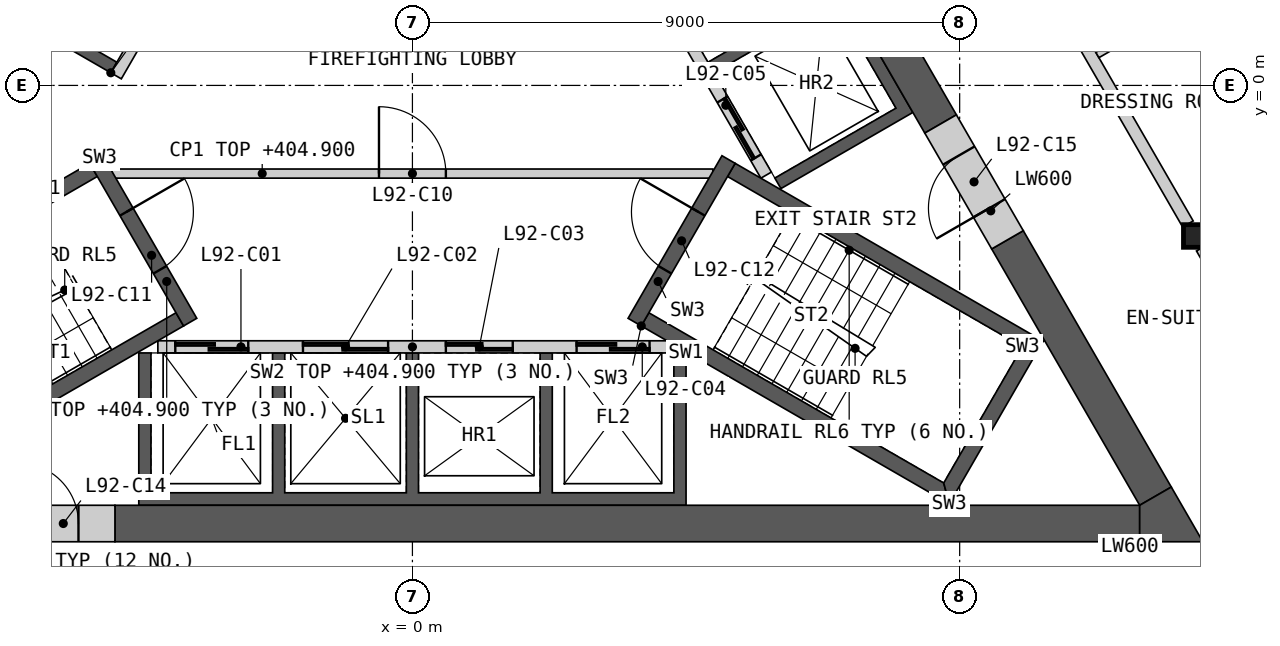
"""IFC4 building model, lengths in metres.
Left out: names, types, materials, properties, quantities, classifications, styles, units other than length and angle.
Written with IfcOpenShell. Run it as: python <this file> out.ifc"""

import sys

from ifc_helpers import new_model, si_unit, direction, frame, frame_2d, origin, origin_2d, place, context, subcontext, project, spatial, polyline, rectangle, i_section, outline, extrude, element, fill, save


model = new_model("IFC4")
c1 = context("Model", 3, precision=1e-05, world=origin(), true_north=direction((0.0, 1.0)))
c2 = subcontext(c1, "Body", "Model", "MODEL_VIEW")
j1 = project(units=[si_unit("LENGTHUNIT", "METRE"), si_unit("PLANEANGLEUNIT", "RADIAN")], contexts=[c1])
p1 = place(None, origin())
s1 = spatial("IfcSite", under=j1, at=p1, CompositionType="ELEMENT")
p2 = place(p1, origin())
s2 = spatial("IfcBuilding", under=s1, at=p2, CompositionType="ELEMENT")
p3 = place(p2, frame((0.0, 0.0, 401.8)))
s3 = spatial("IfcBuildingStorey", under=s2, at=p3, CompositionType="ELEMENT", Elevation=401.8)
p4 = place(p3, frame((12.868, -2.476, 0.0), z_axis=(0.0, 0.0, 1.0), x_axis=(1.0, 0.0, 0.0)))
e1 = element("IfcColumn", 1, at=p4, inside=s3, PredefinedType="COLUMN", context=c2, shape_type="SweptSolid", body=[
    extrude(i_section(OverallWidth=0.374, OverallDepth=0.372, WebThickness=0.016, FlangeThickness=0.026, at=origin_2d()), origin(), (0.0, 0.0, 1.0), 3.4),
])
p5 = place(p3, origin())
e2 = element("IfcWall", 2, at=p5, inside=s3, PredefinedType="SHEAR", context=c2, shape_type="SweptSolid", body=[
    extrude(outline(polyline([(4.5, -4.4), (4.5, -6.906), (-4.5, -6.906), (-4.5, -4.4), (-4.3, -4.4), (-4.3, -6.7), (-2.3, -6.7), (-2.3, -4.4), (-2.1, -4.4), (-2.1, -6.7), (-0.1, -6.7), (-0.1, -4.4), (0.1, -4.4), (0.1, -6.7), (2.1, -6.7), (2.1, -4.4), (2.3, -4.4), (2.3, -6.7), (4.3, -6.7), (4.3, -4.4), (4.5, -4.4)])), origin(), (0.0, 0.0, 1.0), 3.1),
])
p6 = place(p3, frame((-4.187, -4.3, 0.0), z_axis=(0.0, 0.0, 1.0), x_axis=(1.0, 0.0, 0.0)))
e3 = element("IfcWall", 3, at=p6, inside=s3, PredefinedType="SOLIDWALL", context=c2, shape_type="SweptSolid", body=[
    extrude(rectangle(XDim=8.373, YDim=0.2, at=frame_2d((4.187, 0.0))), origin(), (0.0, 0.0, 1.0), 3.1),
])
p7 = place(p6, frame((0.287, 0.0, 0.0)))
e4 = element("IfcOpeningElement", 4, at=p7, cuts=e3, PredefinedType="OPENING", context=c2, shape_type="SweptSolid", body=[
    extrude(rectangle(XDim=1.2, YDim=2.1, at=frame_2d((0.6, 1.05))), frame((0.0, 0.11, 0.0), z_axis=(0.0, -1.0, 0.0), x_axis=(1.0, 0.0, 0.0)), (0.0, 0.0, 1.0), 0.22),
])
p8 = place(p6, frame((2.387, 0.0, 0.0)))
e5 = element("IfcOpeningElement", 5, at=p8, cuts=e3, PredefinedType="OPENING", context=c2, shape_type="SweptSolid", body=[
    extrude(rectangle(XDim=1.4, YDim=2.1, at=frame_2d((0.7, 1.05))), frame((0.0, 0.11, 0.0), z_axis=(0.0, -1.0, 0.0), x_axis=(1.0, 0.0, 0.0)), (0.0, 0.0, 1.0), 0.22),
])
p9 = place(p6, frame((4.737, 0.0, 0.0)))
e6 = element("IfcOpeningElement", 6, at=p9, cuts=e3, PredefinedType="OPENING", context=c2, shape_type="SweptSolid", body=[
    extrude(rectangle(XDim=1.1, YDim=2.1, at=frame_2d((0.55, 1.05))), frame((0.0, 0.11, 0.0), z_axis=(0.0, -1.0, 0.0), x_axis=(1.0, 0.0, 0.0)), (0.0, 0.0, 1.0), 0.22),
])
p10 = place(p6, frame((6.887, 0.0, 0.0)))
e7 = element("IfcOpeningElement", 7, at=p10, cuts=e3, PredefinedType="OPENING", context=c2, shape_type="SweptSolid", body=[
    extrude(rectangle(XDim=1.2, YDim=2.1, at=frame_2d((0.6, 1.05))), frame((0.0, 0.11, 0.0), z_axis=(0.0, -1.0, 0.0), x_axis=(1.0, 0.0, 0.0)), (0.0, 0.0, 1.0), 0.22),
])
p11 = place(p3, origin())
e8 = element("IfcWall", 8, at=p11, inside=s3, PredefinedType="SHEAR", context=c2, shape_type="SweptSolid", body=[
    extrude(outline(polyline([(1.561, 6.097), (3.731, 7.35), (8.231, -0.444), (6.061, -1.697), (5.96, -1.524), (7.952, -0.374), (6.952, 1.358), (4.96, 0.208), (4.861, 0.381), (6.852, 1.531), (5.852, 3.263), (3.861, 2.113), (3.76, 2.287), (5.752, 3.437), (4.752, 5.169), (2.76, 4.019), (2.66, 4.192), (4.652, 5.342), (3.652, 7.074), (1.66, 5.924), (1.561, 6.097)])), origin(), (0.0, 0.0, 1.0), 3.1),
])
p12 = place(p3, frame((5.817, -1.476, 0.0), z_axis=(0.0, 0.0, 1.0), x_axis=(-0.500002616675, 0.866023893041, 0.0)))
e9 = element("IfcWall", 9, at=p12, inside=s3, PredefinedType="SOLIDWALL", context=c2, shape_type="SweptSolid", body=[
    extrude(rectangle(XDim=8.373, YDim=0.2, at=frame_2d((4.187, 0.0))), origin(), (0.0, 0.0, 1.0), 3.1),
])
p13 = place(p12, frame((0.337, 0.0, 0.0)))
e10 = element("IfcOpeningElement", 10, at=p13, cuts=e9, PredefinedType="OPENING", context=c2, shape_type="SweptSolid", body=[
    extrude(rectangle(XDim=1.1, YDim=2.1, at=frame_2d((0.55, 1.05))), frame((0.0, 0.11, 0.0), z_axis=(0.0, -1.0, 0.0), x_axis=(1.0, 0.0, 0.0)), (0.0, 0.0, 1.0), 0.22),
])
p14 = place(p12, frame((2.537, 0.0, 0.0)))
e11 = element("IfcOpeningElement", 11, at=p14, cuts=e9, PredefinedType="OPENING", context=c2, shape_type="SweptSolid", body=[
    extrude(rectangle(XDim=1.1, YDim=2.1, at=frame_2d((0.55, 1.05))), frame((0.0, 0.11, 0.0), z_axis=(0.0, -1.0, 0.0), x_axis=(1.0, 0.0, 0.0)), (0.0, 0.0, 1.0), 0.22),
])
p15 = place(p12, frame((4.737, 0.0, 0.0)))
e12 = element("IfcOpeningElement", 12, at=p15, cuts=e9, PredefinedType="OPENING", context=c2, shape_type="SweptSolid", body=[
    extrude(rectangle(XDim=1.1, YDim=2.1, at=frame_2d((0.55, 1.05))), frame((0.0, 0.11, 0.0), z_axis=(0.0, -1.0, 0.0), x_axis=(1.0, 0.0, 0.0)), (0.0, 0.0, 1.0), 0.22),
])
p16 = place(p12, frame((7.037, 0.0, 0.0)))
e13 = element("IfcOpeningElement", 13, at=p16, cuts=e9, PredefinedType="OPENING", context=c2, shape_type="SweptSolid", body=[
    extrude(rectangle(XDim=0.9, YDim=2.1, at=frame_2d((0.45, 1.05))), frame((0.0, 0.11, 0.0), z_axis=(0.0, -1.0, 0.0), x_axis=(1.0, 0.0, 0.0)), (0.0, 0.0, 1.0), 0.22),
])
p17 = place(p3, origin())
e14 = element("IfcWall", 14, at=p17, inside=s3, PredefinedType="SHEAR", context=c2, shape_type="SweptSolid", body=[
    extrude(outline(polyline([(-4.96, 0.208), (-7.131, 1.461), (-3.731, 7.35), (-1.561, 6.097), (-1.66, 5.924), (-3.652, 7.074), (-6.852, 1.531), (-4.861, 0.381), (-4.96, 0.208)])), origin(), (0.0, 0.0, 1.0), 3.1),
])
p18 = place(p3, frame((-1.631, 5.776, 0.0), z_axis=(0.0, 0.0, 1.0), x_axis=(-0.499992876559, -0.866029516466, 0.0)))
e15 = element("IfcWall", 15, at=p18, inside=s3, PredefinedType="SOLIDWALL", context=c2, shape_type="SweptSolid", body=[
    extrude(rectangle(XDim=6.486, YDim=0.2, at=frame_2d((3.243, 0.0))), origin(), (0.0, 0.0, 1.0), 3.1),
])
p19 = place(p18, frame((2.637, 0.0, 0.0)))
e16 = element("IfcOpeningElement", 16, at=p19, cuts=e15, PredefinedType="OPENING", context=c2, shape_type="SweptSolid", body=[
    extrude(rectangle(XDim=0.9, YDim=2.1, at=frame_2d((0.45, 1.05))), frame((0.0, 0.11, 0.0), z_axis=(0.0, -1.0, 0.0), x_axis=(1.0, 0.0, 0.0)), (0.0, 0.0, 1.0), 0.22),
])
p20 = place(p3, frame((-4.941, -1.45, 0.0), z_axis=(0.0, 0.0, 1.0), x_axis=(1.0, 0.0, 0.0)))
e17 = element("IfcWall", 17, at=p20, inside=s3, PredefinedType="PARTITIONING", context=c2, shape_type="SweptSolid", body=[
    extrude(rectangle(XDim=9.882, YDim=0.15, at=frame_2d((4.941, 0.0))), origin(), (0.0, 0.0, 1.0), 3.1),
])
p21 = place(p20, frame((4.391, 0.0, 0.0)))
e18 = element("IfcOpeningElement", 18, at=p21, cuts=e17, PredefinedType="OPENING", context=c2, shape_type="SweptSolid", body=[
    extrude(rectangle(XDim=1.1, YDim=2.1, at=frame_2d((0.55, 1.05))), frame((0.0, 0.085, 0.0), z_axis=(0.0, -1.0, 0.0), x_axis=(1.0, 0.0, 0.0)), (0.0, 0.0, 1.0), 0.17),
])
p22 = place(p3, origin())
e19 = element("IfcWall", 19, at=p22, inside=s3, PredefinedType="SHEAR", context=c2, shape_type="SweptSolid", body=[
    extrude(outline(polyline([(-5.307, -1.281), (-10.374, -4.206), (-10.032, -4.298), (-5.182, -1.498), (-5.307, -1.281)])), origin(), (0.0, 0.0, 1.0), 3.1),
])
p23 = place(p3, origin())
e20 = element("IfcWall", 20, at=p23, inside=s3, PredefinedType="SHEAR", context=c2, shape_type="SweptSolid", body=[
    extrude(outline(polyline([(-8.738, -6.539), (-8.83, -6.881), (-3.763, -3.956), (-3.888, -3.739), (-8.738, -6.539)])), origin(), (0.0, 0.0, 1.0), 3.1),
])
p24 = place(p3, frame((-5.199, -1.219, 0.0), z_axis=(0.0, 0.0, 1.0), x_axis=(0.499982516597, -0.866035497597, 0.0)))
e21 = element("IfcWall", 21, at=p24, inside=s3, PredefinedType="SHEAR", context=c2, shape_type="SweptSolid", body=[
    extrude(rectangle(XDim=3.088, YDim=0.25, at=frame_2d((1.544, 0.0))), origin(), (0.0, 0.0, 1.0), 3.1),
])
p25 = place(p24, frame((0.994, 0.0, 0.0)))
e22 = element("IfcOpeningElement", 22, at=p25, cuts=e21, PredefinedType="OPENING", context=c2, shape_type="SweptSolid", body=[
    extrude(rectangle(XDim=1.1, YDim=2.1, at=frame_2d((0.55, 1.05))), frame((0.0, 0.135, 0.0), z_axis=(0.0, -1.0, 0.0), x_axis=(1.0, 0.0, 0.0)), (0.0, 0.0, 1.0), 0.27),
])
p26 = place(p3, origin())
e23 = element("IfcWall", 23, at=p26, inside=s3, PredefinedType="SHEAR", context=c2, shape_type="SweptSolid", body=[
    extrude(outline(polyline([(3.763, -3.956), (8.83, -6.881), (8.738, -6.539), (3.888, -3.739), (3.763, -3.956)])), origin(), (0.0, 0.0, 1.0), 3.1),
])
p27 = place(p3, origin())
e24 = element("IfcWall", 24, at=p27, inside=s3, PredefinedType="SHEAR", context=c2, shape_type="SweptSolid", body=[
    extrude(outline(polyline([(8.83, -6.881), (10.374, -4.206), (10.032, -4.298), (8.738, -6.539), (8.83, -6.881)])), origin(), (0.0, 0.0, 1.0), 3.1),
])
p28 = place(p3, origin())
e25 = element("IfcWall", 25, at=p28, inside=s3, PredefinedType="SHEAR", context=c2, shape_type="SweptSolid", body=[
    extrude(outline(polyline([(10.032, -4.298), (10.374, -4.206), (5.307, -1.281), (5.182, -1.498), (10.032, -4.298)])), origin(), (0.0, 0.0, 1.0), 3.1),
])
p29 = place(p3, frame((3.655, -3.893, 0.0), z_axis=(0.0, 0.0, 1.0), x_axis=(0.499982516597, 0.866035497597, 0.0)))
e26 = element("IfcWall", 26, at=p29, inside=s3, PredefinedType="SHEAR", context=c2, shape_type="SweptSolid", body=[
    extrude(rectangle(XDim=3.088, YDim=0.25, at=frame_2d((1.544, 0.0))), origin(), (0.0, 0.0, 1.0), 3.1),
])
p30 = place(p29, frame((0.994, 0.0, 0.0)))
e27 = element("IfcOpeningElement", 27, at=p30, cuts=e26, PredefinedType="OPENING", context=c2, shape_type="SweptSolid", body=[
    extrude(rectangle(XDim=1.1, YDim=2.1, at=frame_2d((0.55, 1.05))), frame((0.0, 0.135, 0.0), z_axis=(0.0, -1.0, 0.0), x_axis=(1.0, 0.0, 0.0)), (0.0, 0.0, 1.0), 0.27),
])
for number, where, z_axis, x_axis in (
    (28, (-4.892, -7.206, 0.0), (0.0, 0.0, 1.0), (1.0, 0.0, 0.0)),
    (29, (8.686, -0.634, 0.0), (0.0, 0.0, 1.0), (-0.5, 0.866, 0.0)),
):
    element("IfcWall", number, at=place(p3, frame(where, z_axis=z_axis, x_axis=x_axis)), inside=s3, PredefinedType="SHEAR", context=c2, shape_type="SweptSolid", body=[
        extrude(rectangle(XDim=16.853, YDim=0.6, at=frame_2d((8.426, 0.0))), origin(), (0.0, 0.0, 1.0), 3.1),
    ])
p31 = place(p3, frame((12.221, -6.756, 0.0), z_axis=(0.0, 0.0, 1.0), x_axis=(-0.50000604952, 0.866021911064, 0.0)))
e30 = element("IfcWall", 30, at=p31, inside=s3, PredefinedType="SHEAR", context=c2, shape_type="SweptSolid", body=[
    extrude(rectangle(XDim=4.869, YDim=0.6, at=frame_2d((2.434, 0.0))), origin(), (0.0, 0.0, 1.0), 3.1),
])
p32 = place(p3, origin())
e31 = element("IfcWall", 31, at=p32, inside=s3, PredefinedType="SHEAR", context=c2, shape_type="SweptSolid", body=[
    extrude(outline(polyline([(11.961, -7.506), (11.961, -6.906), (12.48, -6.606), (13.0, -7.506), (11.961, -7.506)])), origin(), (0.0, 0.0, 1.0), 3.1),
])
p33 = place(p3, frame((-7.092, -7.206, 0.0), z_axis=(0.0, 0.0, 1.0), x_axis=(1.0, 0.0, 0.0)))
e32 = element("IfcWall", 32, at=p33, inside=s3, PredefinedType="SHEAR", context=c2, shape_type="SweptSolid", body=[
    extrude(rectangle(XDim=2.2, YDim=0.6, at=frame_2d((1.1, 0.0))), origin(), (0.0, 0.0, 1.0), 3.1),
])
p34 = place(p33, frame((0.6, 0.0, 0.0)))
e33 = element("IfcOpeningElement", 33, at=p34, cuts=e32, PredefinedType="OPENING", context=c2, shape_type="SweptSolid", body=[
    extrude(rectangle(XDim=1.0, YDim=2.1, at=frame_2d((0.5, 1.05))), frame((0.0, 0.31, 0.0), z_axis=(0.0, -1.0, 0.0), x_axis=(1.0, 0.0, 0.0)), (0.0, 0.0, 1.0), 0.62),
])
p35 = place(p3, frame((9.786, -2.539, 0.0), z_axis=(0.0, 0.0, 1.0), x_axis=(-0.499981787252, 0.866035918664, 0.0)))
e34 = element("IfcWall", 34, at=p35, inside=s3, PredefinedType="SHEAR", context=c2, shape_type="SweptSolid", body=[
    extrude(rectangle(XDim=2.2, YDim=0.6, at=frame_2d((1.1, 0.0))), origin(), (0.0, 0.0, 1.0), 3.1),
])
p36 = place(p35, frame((0.6, 0.0, 0.0)))
e35 = element("IfcOpeningElement", 35, at=p36, cuts=e34, PredefinedType="OPENING", context=c2, shape_type="SweptSolid", body=[
    extrude(rectangle(XDim=1.0, YDim=2.1, at=frame_2d((0.5, 1.05))), frame((0.0, 0.31, 0.0), z_axis=(0.0, -1.0, 0.0), x_axis=(1.0, 0.0, 0.0)), (0.0, 0.0, 1.0), 0.62),
])
p37 = place(p3, frame((8.692, 4.756, 0.0), z_axis=(0.0, 0.0, 1.0), x_axis=(0.500001682468, -0.866024432409, 0.0)))
e36 = element("IfcWall", 36, at=p37, inside=s3, PredefinedType="PARTITIONING", context=c2, shape_type="SweptSolid", body=[
    extrude(rectangle(XDim=8.124, YDim=0.2, at=frame_2d((4.062, 0.0))), origin(), (0.0, 0.0, 1.0), 3.1),
])
p38 = place(p3, frame((12.981, -2.673, 0.0), z_axis=(0.0, 0.0, 1.0), x_axis=(0.499974648164, -0.866040040179, 0.0)))
e37 = element("IfcWall", 37, at=p38, inside=s3, PredefinedType="PARTITIONING", context=c2, shape_type="SweptSolid", body=[
    extrude(rectangle(XDim=4.525, YDim=0.2, at=frame_2d((2.263, 0.0))), origin(), (0.0, 0.0, 1.0), 3.1),
])
p39 = place(p38, frame((2.468, 0.0, 0.0)))
e38 = element("IfcOpeningElement", 38, at=p39, cuts=e37, PredefinedType="OPENING", context=c2, shape_type="SweptSolid", body=[
    extrude(rectangle(XDim=1.0, YDim=2.1, at=frame_2d((0.5, 1.05))), frame((0.0, 0.11, 0.0), z_axis=(0.0, -1.0, 0.0), x_axis=(1.0, 0.0, 0.0)), (0.0, 0.0, 1.0), 0.22),
])
p40 = place(p3, frame((11.265, 0.5, 0.0), z_axis=(0.0, 0.0, 1.0), x_axis=(0.866033839264, 0.499985389037, 0.0)))
e39 = element("IfcWall", 39, at=p40, inside=s3, PredefinedType="PARTITIONING", context=c2, shape_type="SweptSolid", body=[
    extrude(rectangle(XDim=7.1, YDim=0.1, at=frame_2d((3.55, 0.0))), origin(), (0.0, 0.0, 1.0), 2.33),
])
p41 = place(p40, frame((4.992, 0.0, 0.0)))
e40 = element("IfcOpeningElement", 40, at=p41, cuts=e39, PredefinedType="OPENING", context=c2, shape_type="SweptSolid", body=[
    extrude(rectangle(XDim=0.95, YDim=2.1, at=frame_2d((0.475, 1.05))), frame((0.0, 0.06, 0.0), z_axis=(0.0, -1.0, 0.0), x_axis=(1.0, 0.0, 0.0)), (0.0, 0.0, 1.0), 0.12),
])
p42 = place(p7, origin())
e41 = element("IfcDoor", 41, at=p42, inside=s3, OperationType="SLIDING_TO_LEFT", PredefinedType="DOOR", context=c2, shape_type="SweptSolid", body=[
    extrude(rectangle(XDim=1.2, YDim=2.1, at=frame_2d((0.6, 1.05))), frame((0.0, 0.025, 0.0), z_axis=(0.0, -1.0, 0.0), x_axis=(1.0, 0.0, 0.0)), (0.0, 0.0, 1.0), 0.05),
])
fill(e4, e41)
p43 = place(p8, origin())
e42 = element("IfcDoor", 42, at=p43, inside=s3, OperationType="SLIDING_TO_LEFT", PredefinedType="DOOR", context=c2, shape_type="SweptSolid", body=[
    extrude(rectangle(XDim=1.4, YDim=2.1, at=frame_2d((0.7, 1.05))), frame((0.0, 0.025, 0.0), z_axis=(0.0, -1.0, 0.0), x_axis=(1.0, 0.0, 0.0)), (0.0, 0.0, 1.0), 0.05),
])
fill(e5, e42)
p44 = place(p9, origin())
e43 = element("IfcDoor", 43, at=p44, inside=s3, OperationType="SLIDING_TO_LEFT", PredefinedType="DOOR", context=c2, shape_type="SweptSolid", body=[
    extrude(rectangle(XDim=1.1, YDim=2.1, at=frame_2d((0.55, 1.05))), frame((0.0, 0.025, 0.0), z_axis=(0.0, -1.0, 0.0), x_axis=(1.0, 0.0, 0.0)), (0.0, 0.0, 1.0), 0.05),
])
fill(e6, e43)
p45 = place(p10, origin())
e44 = element("IfcDoor", 44, at=p45, inside=s3, OperationType="SLIDING_TO_LEFT", PredefinedType="DOOR", context=c2, shape_type="SweptSolid", body=[
    extrude(rectangle(XDim=1.2, YDim=2.1, at=frame_2d((0.6, 1.05))), frame((0.0, 0.025, 0.0), z_axis=(0.0, -1.0, 0.0), x_axis=(1.0, 0.0, 0.0)), (0.0, 0.0, 1.0), 0.05),
])
fill(e7, e44)
p46 = place(p13, origin())
e45 = element("IfcDoor", 45, at=p46, inside=s3, OperationType="SLIDING_TO_LEFT", PredefinedType="DOOR", context=c2, shape_type="SweptSolid", body=[
    extrude(rectangle(XDim=1.1, YDim=2.1, at=frame_2d((0.55, 1.05))), frame((0.0, 0.025, 0.0), z_axis=(0.0, -1.0, 0.0), x_axis=(1.0, 0.0, 0.0)), (0.0, 0.0, 1.0), 0.05),
])
fill(e10, e45)
p47 = place(p21, origin())
e46 = element("IfcDoor", 46, at=p47, inside=s3, OperationType="SINGLE_SWING_LEFT", PredefinedType="DOOR", context=c2, shape_type="SweptSolid", body=[
    extrude(rectangle(XDim=1.1, YDim=2.1, at=frame_2d((0.55, 1.05))), frame((0.0, 0.025, 0.0), z_axis=(0.0, -1.0, 0.0), x_axis=(1.0, 0.0, 0.0)), (0.0, 0.0, 1.0), 0.05),
])
fill(e18, e46)
p48 = place(p25, origin())
e47 = element("IfcDoor", 47, at=p48, inside=s3, OperationType="SINGLE_SWING_LEFT", PredefinedType="DOOR", context=c2, shape_type="SweptSolid", body=[
    extrude(rectangle(XDim=1.1, YDim=2.1, at=frame_2d((0.55, 1.05))), frame((0.0, 0.025, 0.0), z_axis=(0.0, -1.0, 0.0), x_axis=(1.0, 0.0, 0.0)), (0.0, 0.0, 1.0), 0.05),
])
fill(e22, e47)
p49 = place(p30, origin())
e48 = element("IfcDoor", 48, at=p49, inside=s3, OperationType="SINGLE_SWING_RIGHT", PredefinedType="DOOR", context=c2, shape_type="SweptSolid", body=[
    extrude(rectangle(XDim=1.1, YDim=2.1, at=frame_2d((0.55, 1.05))), frame((0.0, 0.025, 0.0), z_axis=(0.0, -1.0, 0.0), x_axis=(1.0, 0.0, 0.0)), (0.0, 0.0, 1.0), 0.05),
])
fill(e27, e48)
p50 = place(p34, origin())
e49 = element("IfcDoor", 49, at=p50, inside=s3, OperationType="SINGLE_SWING_LEFT", PredefinedType="DOOR", context=c2, shape_type="SweptSolid", body=[
    extrude(rectangle(XDim=1.0, YDim=2.1, at=frame_2d((0.5, 1.05))), frame((0.0, 0.055, 0.0), z_axis=(0.0, -1.0, 0.0), x_axis=(1.0, 0.0, 0.0)), (0.0, 0.0, 1.0), 0.05),
])
fill(e33, e49)
p51 = place(p36, origin())
e50 = element("IfcDoor", 50, at=p51, inside=s3, OperationType="SINGLE_SWING_LEFT", PredefinedType="DOOR", context=c2, shape_type="SweptSolid", body=[
    extrude(rectangle(XDim=1.0, YDim=2.1, at=frame_2d((0.5, 1.05))), frame((0.0, 0.055, 0.0), z_axis=(0.0, -1.0, 0.0), x_axis=(1.0, 0.0, 0.0)), (0.0, 0.0, 1.0), 0.05),
])
fill(e35, e50)
save(model, sys.argv[1])
